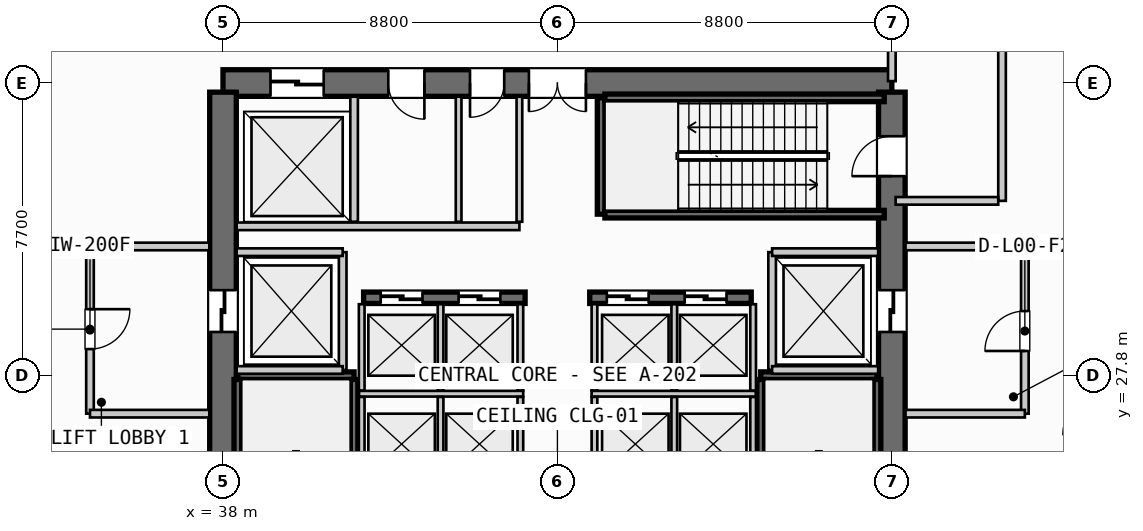
"""IFC4 building model, lengths in metres.
Left out: names, types, materials, properties, quantities, classifications, styles, units other than length and angle.
Written with IfcOpenShell. Run it as: python <this file> out.ifc"""

import sys

from ifc_helpers import new_model, si_unit, direction, frame, frame_2d, origin, place, context, subcontext, project, spatial, rectangle, extrude, source, transform, mapped, element, fill, save


model = new_model("IFC4")
c1 = context("Model", 3, precision=1e-05, world=origin(), true_north=direction((0.0, 1.0)))
c2 = subcontext(c1, "Body", "Model", "MODEL_VIEW")
j1 = project(units=[si_unit("LENGTHUNIT", "METRE"), si_unit("PLANEANGLEUNIT", "RADIAN")], contexts=[c1])
p1 = place(None, origin())
s1 = spatial("IfcSite", under=j1, at=p1, CompositionType="ELEMENT")
p2 = place(p1, origin())
s2 = spatial("IfcBuilding", under=s1, at=p2, CompositionType="ELEMENT")
p3 = place(p2, origin())
s3 = spatial("IfcBuildingStorey", under=s2, at=p3, CompositionType="ELEMENT", Elevation=0.0)
p4 = place(p3, frame((55.6, 35.5, 0.0), z_axis=(0.0, 0.0, 1.0), x_axis=(-1.0, 0.0, 0.0)))
e1 = element("IfcWall", 1, at=p4, inside=s3, PredefinedType="SHEAR", context=c2, shape_type="SweptSolid", body=[
    extrude(rectangle(XDim=17.6, YDim=0.7, at=frame_2d((8.8, 0.0))), origin(), (0.0, 0.0, 1.0), 4.95),
])
p5 = place(p4, frame((8.05, 0.0, 0.0)))
e2 = element("IfcOpeningElement", 2, at=p5, cuts=e1, PredefinedType="OPENING", context=c2, shape_type="SweptSolid", body=[
    extrude(rectangle(XDim=1.5, YDim=2.2, at=frame_2d((0.75, 1.1))), frame((0.0, 0.36, 0.0), z_axis=(0.0, -1.0, 0.0), x_axis=(1.0, 0.0, 0.0)), (0.0, 0.0, 1.0), 0.72),
])
p6 = place(p4, frame((14.95, 0.0, 0.0)))
e3 = element("IfcOpeningElement", 3, at=p6, cuts=e1, PredefinedType="OPENING", context=c2, shape_type="SweptSolid", body=[
    extrude(rectangle(XDim=1.4, YDim=2.3, at=frame_2d((0.7, 1.15))), frame((0.0, 0.36, 0.0), z_axis=(0.0, -1.0, 0.0), x_axis=(1.0, 0.0, 0.0)), (0.0, 0.0, 1.0), 0.72),
])
p7 = place(p4, frame((12.3, 0.0, 0.0)))
e4 = element("IfcOpeningElement", 4, at=p7, cuts=e1, PredefinedType="OPENING", context=c2, shape_type="SweptSolid", body=[
    extrude(rectangle(XDim=0.95, YDim=2.15, at=frame_2d((0.475, 1.075))), frame((0.0, 0.36, 0.0), z_axis=(0.0, -1.0, 0.0), x_axis=(1.0, 0.0, 0.0)), (0.0, 0.0, 1.0), 0.72),
])
p8 = place(p4, frame((10.2, 0.0, 0.0)))
e5 = element("IfcOpeningElement", 5, at=p8, cuts=e1, PredefinedType="OPENING", context=c2, shape_type="SweptSolid", body=[
    extrude(rectangle(XDim=0.9, YDim=2.15, at=frame_2d((0.45, 1.075))), frame((0.0, 0.36, 0.0), z_axis=(0.0, -1.0, 0.0), x_axis=(1.0, 0.0, 0.0)), (0.0, 0.0, 1.0), 0.72),
])
p9 = place(p3, frame((38.0, 35.26, 0.0), z_axis=(0.0, 0.0, 1.0), x_axis=(0.0, -1.0, 0.0)))
e6 = element("IfcWall", 6, at=p9, inside=s3, PredefinedType="SHEAR", context=c2, shape_type="SweptSolid", body=[
    extrude(rectangle(XDim=14.92, YDim=0.7, at=frame_2d((7.46, 0.0))), origin(), (0.0, 0.0, 1.0), 4.95),
])
p10 = place(p9, frame((5.21, 0.0, 0.0)))
e7 = element("IfcOpeningElement", 7, at=p10, cuts=e6, PredefinedType="OPENING", context=c2, shape_type="SweptSolid", body=[
    extrude(rectangle(XDim=1.1, YDim=2.2, at=frame_2d((0.55, 1.1))), frame((0.0, 0.36, 0.0), z_axis=(0.0, -1.0, 0.0), x_axis=(1.0, 0.0, 0.0)), (0.0, 0.0, 1.0), 0.72),
])
p11 = place(p3, frame((55.6, 20.34, 0.0), z_axis=(0.0, 0.0, 1.0), x_axis=(0.0, 1.0, 0.0)))
e8 = element("IfcWall", 8, at=p11, inside=s3, PredefinedType="SHEAR", context=c2, shape_type="SweptSolid", body=[
    extrude(rectangle(XDim=14.92, YDim=0.7, at=frame_2d((7.46, 0.0))), origin(), (0.0, 0.0, 1.0), 4.95),
])
p12 = place(p11, frame((12.71, 0.0, 0.0)))
e9 = element("IfcOpeningElement", 9, at=p12, cuts=e8, PredefinedType="OPENING", context=c2, shape_type="SweptSolid", body=[
    extrude(rectangle(XDim=1.05, YDim=2.15, at=frame_2d((0.525, 1.075))), frame((0.0, 0.36, 0.0), z_axis=(0.0, -1.0, 0.0), x_axis=(1.0, 0.0, 0.0)), (0.0, 0.0, 1.0), 0.72),
])
p13 = place(p11, frame((8.61, 0.0, 0.0)))
e10 = element("IfcOpeningElement", 10, at=p13, cuts=e8, PredefinedType="OPENING", context=c2, shape_type="SweptSolid", body=[
    extrude(rectangle(XDim=1.1, YDim=2.2, at=frame_2d((0.55, 1.1))), frame((0.0, 0.36, 0.0), z_axis=(0.0, -1.0, 0.0), x_axis=(1.0, 0.0, 0.0)), (0.0, 0.0, 1.0), 0.72),
])
p14 = place(p3, frame((41.7, 29.85, 0.0), z_axis=(0.0, 0.0, 1.0), x_axis=(1.0, 0.0, 0.0)))
e11 = element("IfcWall", 11, at=p14, inside=s3, PredefinedType="SHEAR", context=c2, shape_type="SweptSolid", body=[
    extrude(rectangle(XDim=4.25, YDim=0.3, at=frame_2d((2.125, 0.0))), origin(), (0.0, 0.0, 1.0), 4.95),
])
p15 = place(p14, frame((0.45, 0.0, 0.0)))
e12 = element("IfcOpeningElement", 12, at=p15, cuts=e11, PredefinedType="OPENING", context=c2, shape_type="SweptSolid", body=[
    extrude(rectangle(XDim=1.1, YDim=2.2, at=frame_2d((0.55, 1.1))), frame((0.0, 0.16, 0.0), z_axis=(0.0, -1.0, 0.0), x_axis=(1.0, 0.0, 0.0)), (0.0, 0.0, 1.0), 0.32),
])
p16 = place(p14, frame((2.5, 0.0, 0.0)))
e13 = element("IfcOpeningElement", 13, at=p16, cuts=e11, PredefinedType="OPENING", context=c2, shape_type="SweptSolid", body=[
    extrude(rectangle(XDim=1.1, YDim=2.2, at=frame_2d((0.55, 1.1))), frame((0.0, 0.16, 0.0), z_axis=(0.0, -1.0, 0.0), x_axis=(1.0, 0.0, 0.0)), (0.0, 0.0, 1.0), 0.32),
])
p17 = place(p3, frame((47.65, 29.85, 0.0), z_axis=(0.0, 0.0, 1.0), x_axis=(1.0, 0.0, 0.0)))
e14 = element("IfcWall", 14, at=p17, inside=s3, PredefinedType="SHEAR", context=c2, shape_type="SweptSolid", body=[
    extrude(rectangle(XDim=4.25, YDim=0.3, at=frame_2d((2.125, 0.0))), origin(), (0.0, 0.0, 1.0), 4.95),
])
p18 = place(p17, frame((0.45, 0.0, 0.0)))
e15 = element("IfcOpeningElement", 15, at=p18, cuts=e14, PredefinedType="OPENING", context=c2, shape_type="SweptSolid", body=[
    extrude(rectangle(XDim=1.1, YDim=2.2, at=frame_2d((0.55, 1.1))), frame((0.0, 0.16, 0.0), z_axis=(0.0, -1.0, 0.0), x_axis=(1.0, 0.0, 0.0)), (0.0, 0.0, 1.0), 0.32),
])
p19 = place(p17, frame((2.5, 0.0, 0.0)))
e16 = element("IfcOpeningElement", 16, at=p19, cuts=e14, PredefinedType="OPENING", context=c2, shape_type="SweptSolid", body=[
    extrude(rectangle(XDim=1.1, YDim=2.2, at=frame_2d((0.55, 1.1))), frame((0.0, 0.16, 0.0), z_axis=(0.0, -1.0, 0.0), x_axis=(1.0, 0.0, 0.0)), (0.0, 0.0, 1.0), 0.32),
])
p20 = place(p3, frame((38.39, 27.8, 0.0), z_axis=(0.0, 0.0, 1.0), x_axis=(1.0, 0.0, 0.0)))
e17 = element("IfcWall", 17, at=p20, inside=s3, PredefinedType="SHEAR", context=c2, shape_type="SweptSolid", body=[
    extrude(rectangle(XDim=3.06, YDim=0.2, at=frame_2d((1.53, 0.0))), origin(), (0.0, 0.0, 1.0), 4.95),
])
for number, where, z_axis, x_axis in (
    (18, (41.45, 27.7, 0.0), (0.0, 0.0, 1.0), (0.0, -1.0, 0.0)),
    (19, (38.39, 20.35, 0.0), (0.0, 0.0, 1.0), (0.0, 1.0, 0.0)),
):
    element("IfcWall", number, at=place(p3, frame(where, z_axis=z_axis, x_axis=x_axis)), inside=s3, PredefinedType="SHEAR", context=c2, shape_type="SweptSolid", body=[
        extrude(rectangle(XDim=7.35, YDim=0.2, at=frame_2d((3.675, 0.0))), origin(), (0.0, 0.0, 1.0), 4.95),
    ])
p21 = place(p3, frame((52.15, 27.8, 0.0), z_axis=(0.0, 0.0, 1.0), x_axis=(1.0, 0.0, 0.0)))
e20 = element("IfcWall", 20, at=p21, inside=s3, PredefinedType="SHEAR", context=c2, shape_type="SweptSolid", body=[
    extrude(rectangle(XDim=3.06, YDim=0.2, at=frame_2d((1.53, 0.0))), origin(), (0.0, 0.0, 1.0), 4.95),
])
for number, where, z_axis, x_axis in (
    (21, (55.21, 27.7, 0.0), (0.0, 0.0, 1.0), (0.0, -1.0, 0.0)),
    (22, (52.15, 20.35, 0.0), (0.0, 0.0, 1.0), (0.0, 1.0, 0.0)),
):
    element("IfcWall", number, at=place(p3, frame(where, z_axis=z_axis, x_axis=x_axis)), inside=s3, PredefinedType="SHEAR", context=c2, shape_type="SweptSolid", body=[
        extrude(rectangle(XDim=7.35, YDim=0.2, at=frame_2d((3.675, 0.0))), origin(), (0.0, 0.0, 1.0), 4.95),
    ])
p22 = place(p3, frame((47.95, 32.05, 0.0), z_axis=(0.0, 0.0, 1.0), x_axis=(0.0, 1.0, 0.0)))
e23 = element("IfcWall", 23, at=p22, inside=s3, PredefinedType="SHEAR", context=c2, shape_type="SweptSolid", body=[
    extrude(rectangle(XDim=3.06, YDim=0.2, at=frame_2d((1.53, 0.0))), origin(), (0.0, 0.0, 1.0), 4.95),
])
for number, where, z_axis, x_axis in (
    (24, (48.05, 35.11, 0.0), (0.0, 0.0, 1.0), (1.0, 0.0, 0.0)),
    (25, (55.4, 32.05, 0.0), (0.0, 0.0, 1.0), (-1.0, 0.0, 0.0)),
):
    element("IfcWall", number, at=place(p3, frame(where, z_axis=z_axis, x_axis=x_axis)), inside=s3, PredefinedType="SHEAR", context=c2, shape_type="SweptSolid", body=[
        extrude(rectangle(XDim=7.35, YDim=0.2, at=frame_2d((3.675, 0.0))), origin(), (0.0, 0.0, 1.0), 4.95),
    ])
p23 = place(p3, frame((41.15, 27.95, 0.0), z_axis=(0.0, 0.0, 1.0), x_axis=(0.0, 1.0, 0.0)))
e26 = element("IfcWall", 26, at=p23, inside=s3, PredefinedType="PARTITIONING", context=c2, shape_type="SweptSolid", body=[
    extrude(rectangle(XDim=3.1, YDim=0.2, at=frame_2d((1.55, 0.0))), origin(), (0.0, 0.0, 1.0), 4.163),
])
for number, where, z_axis, x_axis in (
    (27, (38.36, 27.95, 0.0), (0.0, 0.0, 1.0), (1.0, 0.0, 0.0)),
    (28, (38.36, 31.05, 0.0), (0.0, 0.0, 1.0), (1.0, 0.0, 0.0)),
):
    element("IfcWall", number, at=place(p3, frame(where, z_axis=z_axis, x_axis=x_axis)), inside=s3, PredefinedType="PARTITIONING", context=c2, shape_type="SweptSolid", body=[
        extrude(rectangle(XDim=2.79, YDim=0.2, at=frame_2d((1.395, 0.0))), origin(), (0.0, 0.0, 1.0), 4.163),
    ])
p24 = place(p3, frame((34.5, 31.2, 0.0), z_axis=(0.0, 0.0, 1.0), x_axis=(0.0, -1.0, 0.0)))
e29 = element("IfcWall", 29, at=p24, inside=s3, PredefinedType="PARTITIONING", context=c2, shape_type="SweptSolid", body=[
    extrude(rectangle(XDim=4.4, YDim=0.2, at=frame_2d((2.2, 0.0))), origin(), (0.0, 0.0, 1.0), 4.163),
])
p25 = place(p24, frame((1.65, 0.0, 0.0)))
e30 = element("IfcOpeningElement", 30, at=p25, cuts=e29, PredefinedType="OPENING", context=c2, shape_type="SweptSolid", body=[
    extrude(rectangle(XDim=1.05, YDim=2.15, at=frame_2d((0.525, 1.075))), frame((0.0, 0.11, 0.0), z_axis=(0.0, -1.0, 0.0), x_axis=(1.0, 0.0, 0.0)), (0.0, 0.0, 1.0), 0.22),
])
for number, where, z_axis, x_axis in (
    (31, (34.5, 26.8, 0.0), (0.0, 0.0, 1.0), (1.0, 0.0, 0.0)),
    (32, (34.5, 31.2, 0.0), (0.0, 0.0, 1.0), (1.0, 0.0, 0.0)),
):
    element("IfcWall", number, at=place(p3, frame(where, z_axis=z_axis, x_axis=x_axis)), inside=s3, PredefinedType="PARTITIONING", context=c2, shape_type="SweptSolid", body=[
        extrude(rectangle(XDim=3.14, YDim=0.2, at=frame_2d((1.57, 0.0))), origin(), (0.0, 0.0, 1.0), 4.163),
    ])
p26 = place(p3, frame((52.45, 27.95, 0.0), z_axis=(0.0, 0.0, 1.0), x_axis=(0.0, 1.0, 0.0)))
e33 = element("IfcWall", 33, at=p26, inside=s3, PredefinedType="PARTITIONING", context=c2, shape_type="SweptSolid", body=[
    extrude(rectangle(XDim=3.1, YDim=0.2, at=frame_2d((1.55, 0.0))), origin(), (0.0, 0.0, 1.0), 4.163),
])
for number, where, z_axis, x_axis in (
    (34, (52.45, 27.95, 0.0), (0.0, 0.0, 1.0), (1.0, 0.0, 0.0)),
    (35, (52.45, 31.05, 0.0), (0.0, 0.0, 1.0), (1.0, 0.0, 0.0)),
):
    element("IfcWall", number, at=place(p3, frame(where, z_axis=z_axis, x_axis=x_axis)), inside=s3, PredefinedType="PARTITIONING", context=c2, shape_type="SweptSolid", body=[
        extrude(rectangle(XDim=2.79, YDim=0.2, at=frame_2d((1.395, 0.0))), origin(), (0.0, 0.0, 1.0), 4.163),
    ])
p27 = place(p3, frame((59.1, 26.8, 0.0), z_axis=(0.0, 0.0, 1.0), x_axis=(0.0, 1.0, 0.0)))
e36 = element("IfcWall", 36, at=p27, inside=s3, PredefinedType="PARTITIONING", context=c2, shape_type="SweptSolid", body=[
    extrude(rectangle(XDim=4.4, YDim=0.2, at=frame_2d((2.2, 0.0))), origin(), (0.0, 0.0, 1.0), 4.163),
])
p28 = place(p27, frame((1.65, 0.0, 0.0)))
e37 = element("IfcOpeningElement", 37, at=p28, cuts=e36, PredefinedType="OPENING", context=c2, shape_type="SweptSolid", body=[
    extrude(rectangle(XDim=1.05, YDim=2.15, at=frame_2d((0.525, 1.075))), frame((0.0, 0.11, 0.0), z_axis=(0.0, -1.0, 0.0), x_axis=(1.0, 0.0, 0.0)), (0.0, 0.0, 1.0), 0.22),
])
for number, where, z_axis, x_axis in (
    (38, (55.96, 26.8, 0.0), (0.0, 0.0, 1.0), (1.0, 0.0, 0.0)),
    (39, (55.96, 31.2, 0.0), (0.0, 0.0, 1.0), (1.0, 0.0, 0.0)),
):
    element("IfcWall", number, at=place(p3, frame(where, z_axis=z_axis, x_axis=x_axis)), inside=s3, PredefinedType="PARTITIONING", context=c2, shape_type="SweptSolid", body=[
        extrude(rectangle(XDim=3.14, YDim=0.2, at=frame_2d((1.57, 0.0))), origin(), (0.0, 0.0, 1.0), 4.163),
    ])
p29 = place(p3, frame((41.58, 27.325, 0.0), z_axis=(0.0, 0.0, 1.0), x_axis=(1.0, 0.0, 0.0)))
e40 = element("IfcWall", 40, at=p29, inside=s3, PredefinedType="PARTITIONING", context=c2, shape_type="SweptSolid", body=[
    extrude(rectangle(XDim=4.32, YDim=0.15, at=frame_2d((2.16, 0.0))), origin(), (0.0, 0.0, 1.0), 4.163),
])
p30 = place(p3, frame((47.7, 27.325, 0.0), z_axis=(0.0, 0.0, 1.0), x_axis=(1.0, 0.0, 0.0)))
e41 = element("IfcWall", 41, at=p30, inside=s3, PredefinedType="PARTITIONING", context=c2, shape_type="SweptSolid", body=[
    extrude(rectangle(XDim=4.32, YDim=0.15, at=frame_2d((2.16, 0.0))), origin(), (0.0, 0.0, 1.0), 4.163),
])
for number, where, z_axis, x_axis in (
    (42, (41.65, 24.92, 0.0), (0.0, 0.0, 1.0), (0.0, 1.0, 0.0)),
    (43, (43.725, 24.92, 0.0), (0.0, 0.0, 1.0), (0.0, 1.0, 0.0)),
    (44, (45.825, 24.92, 0.0), (0.0, 0.0, 1.0), (0.0, 1.0, 0.0)),
    (45, (47.775, 24.92, 0.0), (0.0, 0.0, 1.0), (0.0, 1.0, 0.0)),
    (46, (49.875, 24.92, 0.0), (0.0, 0.0, 1.0), (0.0, 1.0, 0.0)),
    (47, (51.95, 24.92, 0.0), (0.0, 0.0, 1.0), (0.0, 1.0, 0.0)),
):
    element("IfcWall", number, at=place(p3, frame(where, z_axis=z_axis, x_axis=x_axis)), inside=s3, PredefinedType="PARTITIONING", context=c2, shape_type="SweptSolid", body=[
        extrude(rectangle(XDim=2.32, YDim=0.15, at=frame_2d((1.16, 0.0))), origin(), (0.0, 0.0, 1.0), 4.163),
    ])
for number, where, z_axis, x_axis in (
    (48, (41.65, 27.41, 0.0), (0.0, 0.0, 1.0), (0.0, 1.0, 0.0)),
    (49, (43.725, 27.41, 0.0), (0.0, 0.0, 1.0), (0.0, 1.0, 0.0)),
    (50, (45.825, 27.41, 0.0), (0.0, 0.0, 1.0), (0.0, 1.0, 0.0)),
    (51, (47.775, 27.41, 0.0), (0.0, 0.0, 1.0), (0.0, 1.0, 0.0)),
    (52, (49.875, 27.41, 0.0), (0.0, 0.0, 1.0), (0.0, 1.0, 0.0)),
    (53, (51.95, 27.41, 0.0), (0.0, 0.0, 1.0), (0.0, 1.0, 0.0)),
):
    element("IfcWall", number, at=place(p3, frame(where, z_axis=z_axis, x_axis=x_axis)), inside=s3, PredefinedType="PARTITIONING", context=c2, shape_type="SweptSolid", body=[
        extrude(rectangle(XDim=2.27, YDim=0.15, at=frame_2d((1.135, 0.0))), origin(), (0.0, 0.0, 1.0), 4.163),
    ])
p31 = place(p3, frame((41.45, 31.85, 0.0), z_axis=(0.0, 0.0, 1.0), x_axis=(0.0, 1.0, 0.0)))
e54 = element("IfcWall", 54, at=p31, inside=s3, PredefinedType="PARTITIONING", context=c2, shape_type="SweptSolid", body=[
    extrude(rectangle(XDim=3.29, YDim=0.2, at=frame_2d((1.645, 0.0))), origin(), (0.0, 0.0, 1.0), 4.163),
])
p32 = place(p3, frame((38.36, 31.73, 0.0), z_axis=(0.0, 0.0, 1.0), x_axis=(1.0, 0.0, 0.0)))
e55 = element("IfcWall", 55, at=p32, inside=s3, PredefinedType="PARTITIONING", context=c2, shape_type="SweptSolid", body=[
    extrude(rectangle(XDim=7.44, YDim=0.2, at=frame_2d((3.72, 0.0))), origin(), (0.0, 0.0, 1.0), 4.163),
])
p33 = place(p3, frame((45.8, 31.85, 0.0), z_axis=(0.0, 0.0, 1.0), x_axis=(0.0, 1.0, 0.0)))
e56 = element("IfcWall", 56, at=p33, inside=s3, PredefinedType="PARTITIONING", context=c2, shape_type="SweptSolid", body=[
    extrude(rectangle(XDim=3.29, YDim=0.15, at=frame_2d((1.645, 0.0))), origin(), (0.0, 0.0, 1.0), 4.163),
])
p34 = place(p3, frame((44.2, 31.85, 0.0), z_axis=(0.0, 0.0, 1.0), x_axis=(0.0, 1.0, 0.0)))
e57 = element("IfcWall", 57, at=p34, inside=s3, PredefinedType="PLUMBINGWALL", context=c2, shape_type="SweptSolid", body=[
    extrude(rectangle(XDim=3.29, YDim=0.15, at=frame_2d((1.645, 0.0))), origin(), (0.0, 0.0, 1.0), 4.163),
])
p35 = place(p3, frame((58.5, 32.4, 0.0), z_axis=(0.0, 0.0, 1.0), x_axis=(0.0, 1.0, 0.0)))
e58 = element("IfcWall", 58, at=p35, inside=s3, PredefinedType="PARTITIONING", context=c2, shape_type="SweptSolid", body=[
    extrude(rectangle(XDim=20.6, YDim=0.2, at=frame_2d((10.3, 0.0))), origin(), (0.0, 0.0, 1.0), 3.405),
])
p36 = place(p3, frame((55.7, 32.4, 0.0), z_axis=(0.0, 0.0, 1.0), x_axis=(1.0, 0.0, 0.0)))
e59 = element("IfcWall", 59, at=p36, inside=s3, PredefinedType="PARTITIONING", context=c2, shape_type="SweptSolid", body=[
    extrude(rectangle(XDim=2.7, YDim=0.2, at=frame_2d((1.35, 0.0))), origin(), (0.0, 0.0, 1.0), 4.163),
])
p37 = place(p3, frame((55.6, 35.55, 0.0), z_axis=(0.0, 0.0, 1.0), x_axis=(0.0, 1.0, 0.0)))
e60 = element("IfcWall", 60, at=p37, inside=s3, PredefinedType="PARTITIONING", context=c2, shape_type="SweptSolid", body=[
    extrude(rectangle(XDim=17.45, YDim=0.2, at=frame_2d((8.725, 0.0))), origin(), (0.0, 0.0, 1.0), 3.405),
])
p38 = place(p37, frame((4.2, 0.0, 0.0)))
e61 = element("IfcOpeningElement", 61, at=p38, cuts=e60, PredefinedType="OPENING", context=c2, shape_type="SweptSolid", body=[
    extrude(rectangle(XDim=1.5, YDim=2.2, at=frame_2d((0.75, 1.1))), frame((0.0, 0.11, 0.0), z_axis=(0.0, -1.0, 0.0), x_axis=(1.0, 0.0, 0.0)), (0.0, 0.0, 1.0), 0.22),
])
m1 = source(origin(), c2, "Body", "SweptSolid", [
    extrude(rectangle(XDim=1.05, YDim=2.15, at=frame_2d((0.525, 1.075))), frame((0.0, 0.025, 0.0), z_axis=(0.0, -1.0, 0.0), x_axis=(1.0, 0.0, 0.0)), (0.0, 0.0, 1.0), 0.05),
])
p39 = place(p12, origin())
e62 = element("IfcDoor", 62, at=p39, inside=s3, OperationType="SINGLE_SWING_LEFT", PredefinedType="DOOR", context=c2, shape_type="MappedRepresentation", body=[
    mapped(m1, transform((0.0, 0.0, 0.0), scale=1.0)),
])
fill(e9, e62)
m2 = source(origin(), c2, "Body", "SweptSolid", [
    extrude(rectangle(XDim=1.5, YDim=2.2, at=frame_2d((0.75, 1.1))), frame((0.0, 0.025, 0.0), z_axis=(0.0, -1.0, 0.0), x_axis=(1.0, 0.0, 0.0)), (0.0, 0.0, 1.0), 0.05),
])
p40 = place(p5, origin())
e63 = element("IfcDoor", 63, at=p40, inside=s3, OperationType="DOUBLE_DOOR_SINGLE_SWING", PredefinedType="DOOR", context=c2, shape_type="MappedRepresentation", body=[
    mapped(m2, transform((0.0, 0.0, 0.0), scale=1.0)),
])
fill(e2, e63)
m3 = source(origin(), c2, "Body", "SweptSolid", [
    extrude(rectangle(XDim=1.1, YDim=2.2, at=frame_2d((0.55, 1.1))), frame((0.0, 0.025, 0.0), z_axis=(0.0, -1.0, 0.0), x_axis=(1.0, 0.0, 0.0)), (0.0, 0.0, 1.0), 0.05),
])
p41 = place(p10, origin())
e64 = element("IfcDoor", 64, at=p41, inside=s3, OperationType="SLIDING_TO_LEFT", PredefinedType="DOOR", context=c2, shape_type="MappedRepresentation", body=[
    mapped(m3, transform((0.0, 0.0, 0.0), scale=1.0)),
])
fill(e7, e64)
p42 = place(p13, origin())
e65 = element("IfcDoor", 65, at=p42, inside=s3, OperationType="SLIDING_TO_RIGHT", PredefinedType="DOOR", context=c2, shape_type="MappedRepresentation", body=[
    mapped(m3, transform((0.0, 0.0, 0.0), scale=1.0)),
])
fill(e10, e65)
p43 = place(p15, origin())
e66 = element("IfcDoor", 66, at=p43, inside=s3, OperationType="SLIDING_TO_LEFT", PredefinedType="DOOR", context=c2, shape_type="MappedRepresentation", body=[
    mapped(m3, transform((0.0, 0.0, 0.0), scale=1.0)),
])
fill(e12, e66)
p44 = place(p16, origin())
e67 = element("IfcDoor", 67, at=p44, inside=s3, OperationType="SLIDING_TO_LEFT", PredefinedType="DOOR", context=c2, shape_type="MappedRepresentation", body=[
    mapped(m3, transform((0.0, 0.0, 0.0), scale=1.0)),
])
fill(e13, e67)
p45 = place(p18, origin())
e68 = element("IfcDoor", 68, at=p45, inside=s3, OperationType="SLIDING_TO_LEFT", PredefinedType="DOOR", context=c2, shape_type="MappedRepresentation", body=[
    mapped(m3, transform((0.0, 0.0, 0.0), scale=1.0)),
])
fill(e15, e68)
p46 = place(p19, origin())
e69 = element("IfcDoor", 69, at=p46, inside=s3, OperationType="SLIDING_TO_LEFT", PredefinedType="DOOR", context=c2, shape_type="MappedRepresentation", body=[
    mapped(m3, transform((0.0, 0.0, 0.0), scale=1.0)),
])
fill(e16, e69)
m4 = source(origin(), c2, "Body", "SweptSolid", [
    extrude(rectangle(XDim=1.4, YDim=2.3, at=frame_2d((0.7, 1.15))), frame((0.0, 0.025, 0.0), z_axis=(0.0, -1.0, 0.0), x_axis=(1.0, 0.0, 0.0)), (0.0, 0.0, 1.0), 0.05),
])
p47 = place(p6, origin())
e70 = element("IfcDoor", 70, at=p47, inside=s3, OperationType="SLIDING_TO_RIGHT", PredefinedType="DOOR", context=c2, shape_type="MappedRepresentation", body=[
    mapped(m4, transform((0.0, 0.0, 0.0), scale=1.0)),
])
fill(e3, e70)
m5 = source(origin(), c2, "Body", "SweptSolid", [
    extrude(rectangle(XDim=0.95, YDim=2.15, at=frame_2d((0.475, 1.075))), frame((0.0, 0.025, 0.0), z_axis=(0.0, -1.0, 0.0), x_axis=(1.0, 0.0, 0.0)), (0.0, 0.0, 1.0), 0.05),
])
p48 = place(p7, origin())
e71 = element("IfcDoor", 71, at=p48, inside=s3, OperationType="SINGLE_SWING_LEFT", PredefinedType="DOOR", context=c2, shape_type="MappedRepresentation", body=[
    mapped(m5, transform((0.0, 0.0, 0.0), scale=1.0)),
])
fill(e4, e71)
m6 = source(origin(), c2, "Body", "SweptSolid", [
    extrude(rectangle(XDim=0.9, YDim=2.15, at=frame_2d((0.45, 1.075))), frame((0.0, 0.025, 0.0), z_axis=(0.0, -1.0, 0.0), x_axis=(1.0, 0.0, 0.0)), (0.0, 0.0, 1.0), 0.05),
])
p49 = place(p8, origin())
e72 = element("IfcDoor", 72, at=p49, inside=s3, OperationType="SINGLE_SWING_RIGHT", PredefinedType="DOOR", context=c2, shape_type="MappedRepresentation", body=[
    mapped(m6, transform((0.0, 0.0, 0.0), scale=1.0)),
])
fill(e5, e72)
p50 = place(p25, origin())
e73 = element("IfcDoor", 73, at=p50, inside=s3, OperationType="SINGLE_SWING_LEFT", PredefinedType="DOOR", context=c2, shape_type="MappedRepresentation", body=[
    mapped(m1, transform((0.0, 0.0, 0.0), scale=1.0)),
])
fill(e30, e73)
p51 = place(p28, origin())
e74 = element("IfcDoor", 74, at=p51, inside=s3, OperationType="SINGLE_SWING_LEFT", PredefinedType="DOOR", context=c2, shape_type="MappedRepresentation", body=[
    mapped(m1, transform((0.0, 0.0, 0.0), scale=1.0)),
])
fill(e37, e74)
save(model, sys.argv[1])
